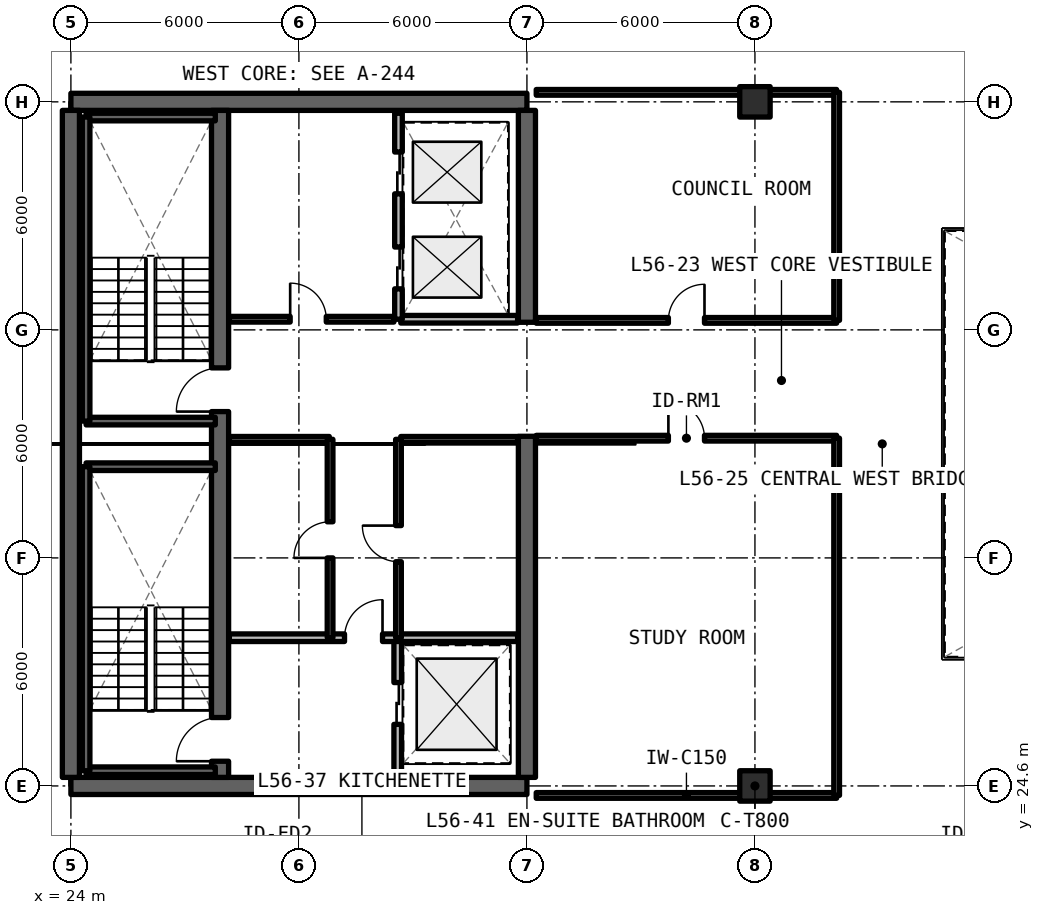
"""IFC4 building model, lengths in metres.
Left out: names, types, materials, properties, quantities, classifications, styles, units other than length and angle.
Written with IfcOpenShell. Run it as: python <this file> out.ifc"""

import sys

from ifc_helpers import new_model, si_unit, direction, frame, frame_2d, origin, origin_2d, place, context, subcontext, project, spatial, rectangle, extrude, element, fill, save


model = new_model("IFC4")
c1 = context("Model", 3, precision=1e-05, world=origin(), true_north=direction((0.0, 1.0)))
c2 = subcontext(c1, "Body", "Model", "MODEL_VIEW")
j1 = project(units=[si_unit("LENGTHUNIT", "METRE"), si_unit("PLANEANGLEUNIT", "RADIAN")], contexts=[c1])
p1 = place(None, origin())
s1 = spatial("IfcSite", under=j1, at=p1, CompositionType="ELEMENT")
p2 = place(p1, origin())
s2 = spatial("IfcBuilding", under=s1, at=p2, CompositionType="ELEMENT")
p3 = place(p2, frame((0.0, 0.0, 201.63)))
s3 = spatial("IfcBuildingStorey", under=s2, at=p3, CompositionType="ELEMENT", Elevation=201.63)
for number, where, z_axis, x_axis in (
    (1, (24.0, 24.6, 0.0), (0.0, 0.0, 1.0), (1.0, 0.0, 0.0)),
    (2, (36.0, 42.6, 0.0), (0.0, 0.0, 1.0), (-1.0, 0.0, 0.0)),
):
    element("IfcWall", number, at=place(p3, frame(where, z_axis=z_axis, x_axis=x_axis)), inside=s3, PredefinedType="SHEAR", context=c2, shape_type="SweptSolid", body=[
        extrude(rectangle(XDim=12.0, YDim=0.45, at=frame_2d((6.0, 0.0))), origin(), (0.0, 0.0, 1.0), 3.3),
    ])
p4 = place(p3, frame((24.0, 24.825, 0.0), z_axis=(0.0, 0.0, 1.0), x_axis=(0.0, 1.0, 0.0)))
e3 = element("IfcWall", 3, at=p4, inside=s3, PredefinedType="SHEAR", context=c2, shape_type="SweptSolid", body=[
    extrude(rectangle(XDim=17.55, YDim=0.45, at=frame_2d((8.775, 0.0))), origin(), (0.0, 0.0, 1.0), 3.3),
])
p5 = place(p3, frame((36.0, 24.825, 0.0), z_axis=(0.0, 0.0, 1.0), x_axis=(0.0, 1.0, 0.0)))
e4 = element("IfcWall", 4, at=p5, inside=s3, PredefinedType="SHEAR", context=c2, shape_type="SweptSolid", body=[
    extrude(rectangle(XDim=8.975, YDim=0.45, at=frame_2d((4.488, 0.0))), origin(), (0.0, 0.0, 1.0), 3.3),
])
p6 = place(p3, frame((36.0, 36.8, 0.0), z_axis=(0.0, 0.0, 1.0), x_axis=(0.0, 1.0, 0.0)))
e5 = element("IfcWall", 5, at=p6, inside=s3, PredefinedType="SHEAR", context=c2, shape_type="SweptSolid", body=[
    extrude(rectangle(XDim=5.575, YDim=0.45, at=frame_2d((2.788, 0.0))), origin(), (0.0, 0.0, 1.0), 3.3),
])
p7 = place(p3, frame((27.925, 24.825, 0.0), z_axis=(0.0, 0.0, 1.0), x_axis=(0.0, 1.0, 0.0)))
e6 = element("IfcWall", 6, at=p7, inside=s3, PredefinedType="SHEAR", context=c2, shape_type="SweptSolid", body=[
    extrude(rectangle(XDim=17.55, YDim=0.45, at=frame_2d((8.775, 0.0))), origin(), (0.0, 0.0, 1.0), 3.3),
])
p8 = place(p7, frame((0.425, 0.0, 0.0)))
e7 = element("IfcOpeningElement", 7, at=p8, cuts=e6, PredefinedType="OPENING", context=c2, shape_type="SweptSolid", body=[
    extrude(rectangle(XDim=1.15, YDim=2.15, at=frame_2d((0.575, 1.075))), frame((0.0, 0.235, 0.0), z_axis=(0.0, -1.0, 0.0), x_axis=(1.0, 0.0, 0.0)), (0.0, 0.0, 1.0), 0.47),
])
p9 = place(p7, frame((9.625, 0.0, 0.0)))
e8 = element("IfcOpeningElement", 8, at=p9, cuts=e6, PredefinedType="OPENING", context=c2, shape_type="SweptSolid", body=[
    extrude(rectangle(XDim=1.15, YDim=2.15, at=frame_2d((0.575, 1.075))), frame((0.0, 0.235, 0.0), z_axis=(0.0, -1.0, 0.0), x_axis=(1.0, 0.0, 0.0)), (0.0, 0.0, 1.0), 0.47),
])
for number, where, z_axis, x_axis in (
    (9, (42.0, 24.6, 0.0), (0.0, 0.0, 1.0), (1.0, 0.0, 0.0)),
    (10, (42.0, 42.6, 0.0), (0.0, 0.0, 1.0), (1.0, 0.0, 0.0)),
):
    element("IfcColumn", number, at=place(p3, frame(where, z_axis=z_axis, x_axis=x_axis)), inside=s3, PredefinedType="COLUMN", context=c2, shape_type="SweptSolid", body=[
        extrude(rectangle(XDim=0.8, YDim=0.8, at=origin_2d()), origin(), (0.0, 0.0, 1.0), 3.3),
    ])
p10 = place(p3, frame((32.6, 24.92, 0.0), z_axis=(0.0, 0.0, 1.0), x_axis=(0.0, 1.0, 0.0)))
e11 = element("IfcWall", 11, at=p10, inside=s3, PredefinedType="SOLIDWALL", context=c2, shape_type="SweptSolid", body=[
    extrude(rectangle(XDim=3.58, YDim=0.2, at=frame_2d((1.79, 0.0))), origin(), (0.0, 0.0, 1.0), 2.35),
])
p11 = place(p10, frame((1.3, 0.0, 0.0)))
e12 = element("IfcOpeningElement", 12, at=p11, cuts=e11, PredefinedType="OPENING", context=c2, shape_type="SweptSolid", body=[
    extrude(rectangle(XDim=1.1, YDim=2.2, at=frame_2d((0.55, 1.1))), frame((0.0, 0.11, 0.0), z_axis=(0.0, -1.0, 0.0), x_axis=(1.0, 0.0, 0.0)), (0.0, 0.0, 1.0), 0.22),
])
p12 = place(p3, frame((28.17, 28.5, 0.0), z_axis=(0.0, 0.0, 1.0), x_axis=(1.0, 0.0, 0.0)))
e13 = element("IfcWall", 13, at=p12, inside=s3, PredefinedType="SOLIDWALL", context=c2, shape_type="SweptSolid", body=[
    extrude(rectangle(XDim=7.585, YDim=0.2, at=frame_2d((3.792, 0.0))), origin(), (0.0, 0.0, 1.0), 2.35),
])
p13 = place(p12, frame((3.03, 0.0, 0.0)))
e14 = element("IfcOpeningElement", 14, at=p13, cuts=e13, PredefinedType="OPENING", context=c2, shape_type="SweptSolid", body=[
    extrude(rectangle(XDim=1.0, YDim=2.15, at=frame_2d((0.5, 1.075))), frame((0.0, 0.11, 0.0), z_axis=(0.0, -1.0, 0.0), x_axis=(1.0, 0.0, 0.0)), (0.0, 0.0, 1.0), 0.22),
])
p14 = place(p3, frame((28.17, 33.72, 0.0), z_axis=(0.0, 0.0, 1.0), x_axis=(1.0, 0.0, 0.0)))
e15 = element("IfcWall", 15, at=p14, inside=s3, PredefinedType="SOLIDWALL", context=c2, shape_type="SweptSolid", body=[
    extrude(rectangle(XDim=2.63, YDim=0.15, at=frame_2d((1.315, 0.0))), origin(), (0.0, 0.0, 1.0), 2.35),
])
p15 = place(p3, frame((30.82, 28.5, 0.0), z_axis=(0.0, 0.0, 1.0), x_axis=(0.0, 1.0, 0.0)))
e16 = element("IfcWall", 16, at=p15, inside=s3, PredefinedType="SOLIDWALL", context=c2, shape_type="SweptSolid", body=[
    extrude(rectangle(XDim=5.22, YDim=0.15, at=frame_2d((2.61, 0.0))), origin(), (0.0, 0.0, 1.0), 2.35),
])
p16 = place(p15, frame((2.1, 0.0, 0.0)))
e17 = element("IfcOpeningElement", 17, at=p16, cuts=e16, PredefinedType="OPENING", context=c2, shape_type="SweptSolid", body=[
    extrude(rectangle(XDim=0.95, YDim=2.15, at=frame_2d((0.475, 1.075))), frame((0.0, 0.085, 0.0), z_axis=(0.0, -1.0, 0.0), x_axis=(1.0, 0.0, 0.0)), (0.0, 0.0, 1.0), 0.17),
])
p17 = place(p3, frame((32.68, 33.72, 0.0), z_axis=(0.0, 0.0, 1.0), x_axis=(1.0, 0.0, 0.0)))
e18 = element("IfcWall", 18, at=p17, inside=s3, PredefinedType="SOLIDWALL", context=c2, shape_type="SweptSolid", body=[
    extrude(rectangle(XDim=3.075, YDim=0.15, at=frame_2d((1.538, 0.0))), origin(), (0.0, 0.0, 1.0), 2.35),
])
p18 = place(p3, frame((32.62, 28.5, 0.0), z_axis=(0.0, 0.0, 1.0), x_axis=(0.0, 1.0, 0.0)))
e19 = element("IfcWall", 19, at=p18, inside=s3, PredefinedType="SOLIDWALL", context=c2, shape_type="SweptSolid", body=[
    extrude(rectangle(XDim=5.22, YDim=0.15, at=frame_2d((2.61, 0.0))), origin(), (0.0, 0.0, 1.0), 2.35),
])
p19 = place(p18, frame((2.0, 0.0, 0.0)))
e20 = element("IfcOpeningElement", 20, at=p19, cuts=e19, PredefinedType="OPENING", context=c2, shape_type="SweptSolid", body=[
    extrude(rectangle(XDim=0.95, YDim=2.15, at=frame_2d((0.475, 1.075))), frame((0.0, 0.085, 0.0), z_axis=(0.0, -1.0, 0.0), x_axis=(1.0, 0.0, 0.0)), (0.0, 0.0, 1.0), 0.17),
])
p20 = place(p3, frame((28.17, 36.88, 0.0), z_axis=(0.0, 0.0, 1.0), x_axis=(1.0, 0.0, 0.0)))
e21 = element("IfcWall", 21, at=p20, inside=s3, PredefinedType="SOLIDWALL", context=c2, shape_type="SweptSolid", body=[
    extrude(rectangle(XDim=4.33, YDim=0.15, at=frame_2d((2.165, 0.0))), origin(), (0.0, 0.0, 1.0), 2.35),
])
p21 = place(p20, frame((1.6, 0.0, 0.0)))
e22 = element("IfcOpeningElement", 22, at=p21, cuts=e21, PredefinedType="OPENING", context=c2, shape_type="SweptSolid", body=[
    extrude(rectangle(XDim=0.95, YDim=2.15, at=frame_2d((0.475, 1.075))), frame((0.0, 0.085, 0.0), z_axis=(0.0, -1.0, 0.0), x_axis=(1.0, 0.0, 0.0)), (0.0, 0.0, 1.0), 0.17),
])
p22 = place(p3, frame((32.68, 36.88, 0.0), z_axis=(0.0, 0.0, 1.0), x_axis=(1.0, 0.0, 0.0)))
e23 = element("IfcWall", 23, at=p22, inside=s3, PredefinedType="SOLIDWALL", context=c2, shape_type="SweptSolid", body=[
    extrude(rectangle(XDim=3.075, YDim=0.2, at=frame_2d((1.538, 0.0))), origin(), (0.0, 0.0, 1.0), 2.35),
])
p23 = place(p3, frame((32.62, 36.88, 0.0), z_axis=(0.0, 0.0, 1.0), x_axis=(0.0, 1.0, 0.0)))
e24 = element("IfcWall", 24, at=p23, inside=s3, PredefinedType="SOLIDWALL", context=c2, shape_type="SweptSolid", body=[
    extrude(rectangle(XDim=5.42, YDim=0.2, at=frame_2d((2.71, 0.0))), origin(), (0.0, 0.0, 1.0), 2.35),
])
p24 = place(p23, frame((0.8, 0.0, 0.0)))
e25 = element("IfcOpeningElement", 25, at=p24, cuts=e24, PredefinedType="OPENING", context=c2, shape_type="SweptSolid", body=[
    extrude(rectangle(XDim=1.1, YDim=2.2, at=frame_2d((0.55, 1.1))), frame((0.0, 0.11, 0.0), z_axis=(0.0, -1.0, 0.0), x_axis=(1.0, 0.0, 0.0)), (0.0, 0.0, 1.0), 0.22),
])
p25 = place(p23, frame((3.3, 0.0, 0.0)))
e26 = element("IfcOpeningElement", 26, at=p25, cuts=e24, PredefinedType="OPENING", context=c2, shape_type="SweptSolid", body=[
    extrude(rectangle(XDim=1.1, YDim=2.2, at=frame_2d((0.55, 1.1))), frame((0.0, 0.11, 0.0), z_axis=(0.0, -1.0, 0.0), x_axis=(1.0, 0.0, 0.0)), (0.0, 0.0, 1.0), 0.22),
])
p26 = place(p3, frame((36.245, 24.35, 0.0), z_axis=(0.0, 0.0, 1.0), x_axis=(1.0, 0.0, 0.0)))
e27 = element("IfcWall", 27, at=p26, inside=s3, PredefinedType="SOLIDWALL", context=c2, shape_type="SweptSolid", body=[
    extrude(rectangle(XDim=7.905, YDim=0.15, at=frame_2d((3.952, 0.0))), origin(), (0.0, 0.0, 1.0), 2.35),
])
p27 = place(p3, frame((36.245, 33.75, 0.0), z_axis=(0.0, 0.0, 1.0), x_axis=(1.0, 0.0, 0.0)))
e28 = element("IfcWall", 28, at=p27, inside=s3, PredefinedType="SOLIDWALL", context=c2, shape_type="SweptSolid", body=[
    extrude(rectangle(XDim=7.905, YDim=0.15, at=frame_2d((3.952, 0.0))), origin(), (0.0, 0.0, 1.0), 2.35),
])
p28 = place(p27, frame((3.478, 0.0, 0.0)))
e29 = element("IfcOpeningElement", 29, at=p28, cuts=e28, PredefinedType="OPENING", context=c2, shape_type="SweptSolid", body=[
    extrude(rectangle(XDim=0.95, YDim=2.15, at=frame_2d((0.475, 1.075))), frame((0.0, 0.085, 0.0), z_axis=(0.0, -1.0, 0.0), x_axis=(1.0, 0.0, 0.0)), (0.0, 0.0, 1.0), 0.17),
])
p29 = place(p3, frame((44.15, 24.35, 0.0), z_axis=(0.0, 0.0, 1.0), x_axis=(0.0, 1.0, 0.0)))
e30 = element("IfcWall", 30, at=p29, inside=s3, PredefinedType="SOLIDWALL", context=c2, shape_type="SweptSolid", body=[
    extrude(rectangle(XDim=9.4, YDim=0.15, at=frame_2d((4.7, 0.0))), origin(), (0.0, 0.0, 1.0), 2.35),
])
p30 = place(p3, frame((36.245, 36.85, 0.0), z_axis=(0.0, 0.0, 1.0), x_axis=(1.0, 0.0, 0.0)))
e31 = element("IfcWall", 31, at=p30, inside=s3, PredefinedType="SOLIDWALL", context=c2, shape_type="SweptSolid", body=[
    extrude(rectangle(XDim=7.905, YDim=0.15, at=frame_2d((3.952, 0.0))), origin(), (0.0, 0.0, 1.0), 2.35),
])
p31 = place(p30, frame((3.478, 0.0, 0.0)))
e32 = element("IfcOpeningElement", 32, at=p31, cuts=e31, PredefinedType="OPENING", context=c2, shape_type="SweptSolid", body=[
    extrude(rectangle(XDim=0.95, YDim=2.15, at=frame_2d((0.475, 1.075))), frame((0.0, 0.085, 0.0), z_axis=(0.0, -1.0, 0.0), x_axis=(1.0, 0.0, 0.0)), (0.0, 0.0, 1.0), 0.17),
])
p32 = place(p3, frame((36.245, 42.85, 0.0), z_axis=(0.0, 0.0, 1.0), x_axis=(1.0, 0.0, 0.0)))
e33 = element("IfcWall", 33, at=p32, inside=s3, PredefinedType="SOLIDWALL", context=c2, shape_type="SweptSolid", body=[
    extrude(rectangle(XDim=7.905, YDim=0.15, at=frame_2d((3.952, 0.0))), origin(), (0.0, 0.0, 1.0), 2.35),
])
p33 = place(p3, frame((44.15, 36.85, 0.0), z_axis=(0.0, 0.0, 1.0), x_axis=(0.0, 1.0, 0.0)))
e34 = element("IfcWall", 34, at=p33, inside=s3, PredefinedType="SOLIDWALL", context=c2, shape_type="SweptSolid", body=[
    extrude(rectangle(XDim=6.0, YDim=0.15, at=frame_2d((3.0, 0.0))), origin(), (0.0, 0.0, 1.0), 2.35),
])
for number, where, z_axis, x_axis in (
    (35, (24.4, 25.0, 0.0), (0.0, 0.0, 1.0), (1.0, 0.0, 0.0)),
    (36, (27.8, 33.0, 0.0), (0.0, 0.0, 1.0), (-1.0, 0.0, 0.0)),
):
    element("IfcWall", number, at=place(p3, frame(where, z_axis=z_axis, x_axis=x_axis)), inside=s3, PredefinedType="SOLIDWALL", context=c2, shape_type="SweptSolid", body=[
        extrude(rectangle(XDim=3.4, YDim=0.2, at=frame_2d((1.7, 0.0))), origin(), (0.0, 0.0, 1.0), 3.3),
    ])
p34 = place(p3, frame((24.4, 33.0, 0.0), z_axis=(0.0, 0.0, 1.0), x_axis=(0.0, -1.0, 0.0)))
e37 = element("IfcWall", 37, at=p34, inside=s3, PredefinedType="SOLIDWALL", context=c2, shape_type="SweptSolid", body=[
    extrude(rectangle(XDim=8.0, YDim=0.2, at=frame_2d((4.0, 0.0))), origin(), (0.0, 0.0, 1.0), 3.3),
])
for number, where, z_axis, x_axis in (
    (38, (24.4, 34.2, 0.0), (0.0, 0.0, 1.0), (1.0, 0.0, 0.0)),
    (39, (27.8, 42.2, 0.0), (0.0, 0.0, 1.0), (-1.0, 0.0, 0.0)),
):
    element("IfcWall", number, at=place(p3, frame(where, z_axis=z_axis, x_axis=x_axis)), inside=s3, PredefinedType="SOLIDWALL", context=c2, shape_type="SweptSolid", body=[
        extrude(rectangle(XDim=3.4, YDim=0.2, at=frame_2d((1.7, 0.0))), origin(), (0.0, 0.0, 1.0), 3.3),
    ])
p35 = place(p3, frame((24.4, 42.2, 0.0), z_axis=(0.0, 0.0, 1.0), x_axis=(0.0, -1.0, 0.0)))
e40 = element("IfcWall", 40, at=p35, inside=s3, PredefinedType="SOLIDWALL", context=c2, shape_type="SweptSolid", body=[
    extrude(rectangle(XDim=8.0, YDim=0.2, at=frame_2d((4.0, 0.0))), origin(), (0.0, 0.0, 1.0), 3.3),
])
p36 = place(p11, origin())
e41 = element("IfcDoor", 41, at=p36, inside=s3, OperationType="SLIDING_TO_LEFT", PredefinedType="DOOR", context=c2, shape_type="SweptSolid", body=[
    extrude(rectangle(XDim=1.1, YDim=2.2, at=frame_2d((0.55, 1.1))), frame((0.0, 0.025, 0.0), z_axis=(0.0, -1.0, 0.0), x_axis=(1.0, 0.0, 0.0)), (0.0, 0.0, 1.0), 0.05),
])
fill(e12, e41)
p37 = place(p13, origin())
e42 = element("IfcDoor", 42, at=p37, inside=s3, OperationType="SINGLE_SWING_RIGHT", PredefinedType="DOOR", context=c2, shape_type="SweptSolid", body=[
    extrude(rectangle(XDim=1.0, YDim=2.15, at=frame_2d((0.5, 1.075))), frame((0.0, 0.025, 0.0), z_axis=(0.0, -1.0, 0.0), x_axis=(1.0, 0.0, 0.0)), (0.0, 0.0, 1.0), 0.05),
])
fill(e14, e42)
p38 = place(p16, origin())
e43 = element("IfcDoor", 43, at=p38, inside=s3, OperationType="SINGLE_SWING_LEFT", PredefinedType="DOOR", context=c2, shape_type="SweptSolid", body=[
    extrude(rectangle(XDim=0.95, YDim=2.15, at=frame_2d((0.475, 1.075))), frame((0.0, 0.025, 0.0), z_axis=(0.0, -1.0, 0.0), x_axis=(1.0, 0.0, 0.0)), (0.0, 0.0, 1.0), 0.05),
])
fill(e17, e43)
p39 = place(p19, origin())
e44 = element("IfcDoor", 44, at=p39, inside=s3, OperationType="SINGLE_SWING_RIGHT", PredefinedType="DOOR", context=c2, shape_type="SweptSolid", body=[
    extrude(rectangle(XDim=0.95, YDim=2.15, at=frame_2d((0.475, 1.075))), frame((0.0, 0.025, 0.0), z_axis=(0.0, -1.0, 0.0), x_axis=(1.0, 0.0, 0.0)), (0.0, 0.0, 1.0), 0.05),
])
fill(e20, e44)
p40 = place(p21, origin())
e45 = element("IfcDoor", 45, at=p40, inside=s3, OperationType="SINGLE_SWING_LEFT", PredefinedType="DOOR", context=c2, shape_type="SweptSolid", body=[
    extrude(rectangle(XDim=0.95, YDim=2.15, at=frame_2d((0.475, 1.075))), frame((0.0, 0.025, 0.0), z_axis=(0.0, -1.0, 0.0), x_axis=(1.0, 0.0, 0.0)), (0.0, 0.0, 1.0), 0.05),
])
fill(e22, e45)
p41 = place(p24, origin())
e46 = element("IfcDoor", 46, at=p41, inside=s3, OperationType="SLIDING_TO_LEFT", PredefinedType="DOOR", context=c2, shape_type="SweptSolid", body=[
    extrude(rectangle(XDim=1.1, YDim=2.2, at=frame_2d((0.55, 1.1))), frame((0.0, 0.025, 0.0), z_axis=(0.0, -1.0, 0.0), x_axis=(1.0, 0.0, 0.0)), (0.0, 0.0, 1.0), 0.05),
])
fill(e25, e46)
p42 = place(p25, origin())
e47 = element("IfcDoor", 47, at=p42, inside=s3, OperationType="SLIDING_TO_RIGHT", PredefinedType="DOOR", context=c2, shape_type="SweptSolid", body=[
    extrude(rectangle(XDim=1.1, YDim=2.2, at=frame_2d((0.55, 1.1))), frame((0.0, 0.025, 0.0), z_axis=(0.0, -1.0, 0.0), x_axis=(1.0, 0.0, 0.0)), (0.0, 0.0, 1.0), 0.05),
])
fill(e26, e47)
p43 = place(p28, origin())
e48 = element("IfcDoor", 48, at=p43, inside=s3, OperationType="SINGLE_SWING_LEFT", PredefinedType="DOOR", context=c2, shape_type="SweptSolid", body=[
    extrude(rectangle(XDim=0.95, YDim=2.15, at=frame_2d((0.475, 1.075))), frame((0.0, 0.025, 0.0), z_axis=(0.0, -1.0, 0.0), x_axis=(1.0, 0.0, 0.0)), (0.0, 0.0, 1.0), 0.05),
])
fill(e29, e48)
p44 = place(p31, origin())
e49 = element("IfcDoor", 49, at=p44, inside=s3, OperationType="SINGLE_SWING_RIGHT", PredefinedType="DOOR", context=c2, shape_type="SweptSolid", body=[
    extrude(rectangle(XDim=0.95, YDim=2.15, at=frame_2d((0.475, 1.075))), frame((0.0, 0.025, 0.0), z_axis=(0.0, -1.0, 0.0), x_axis=(1.0, 0.0, 0.0)), (0.0, 0.0, 1.0), 0.05),
])
fill(e32, e49)
p45 = place(p8, origin())
e50 = element("IfcDoor", 50, at=p45, inside=s3, OperationType="SINGLE_SWING_RIGHT", PredefinedType="DOOR", context=c2, shape_type="SweptSolid", body=[
    extrude(rectangle(XDim=1.15, YDim=2.15, at=frame_2d((0.575, 1.075))), frame((0.0, 0.025, 0.0), z_axis=(0.0, -1.0, 0.0), x_axis=(1.0, 0.0, 0.0)), (0.0, 0.0, 1.0), 0.05),
])
fill(e7, e50)
p46 = place(p9, origin())
e51 = element("IfcDoor", 51, at=p46, inside=s3, OperationType="SINGLE_SWING_LEFT", PredefinedType="DOOR", context=c2, shape_type="SweptSolid", body=[
    extrude(rectangle(XDim=1.15, YDim=2.15, at=frame_2d((0.575, 1.075))), frame((0.0, 0.025, 0.0), z_axis=(0.0, -1.0, 0.0), x_axis=(1.0, 0.0, 0.0)), (0.0, 0.0, 1.0), 0.05),
])
fill(e8, e51)
save(model, sys.argv[1])
